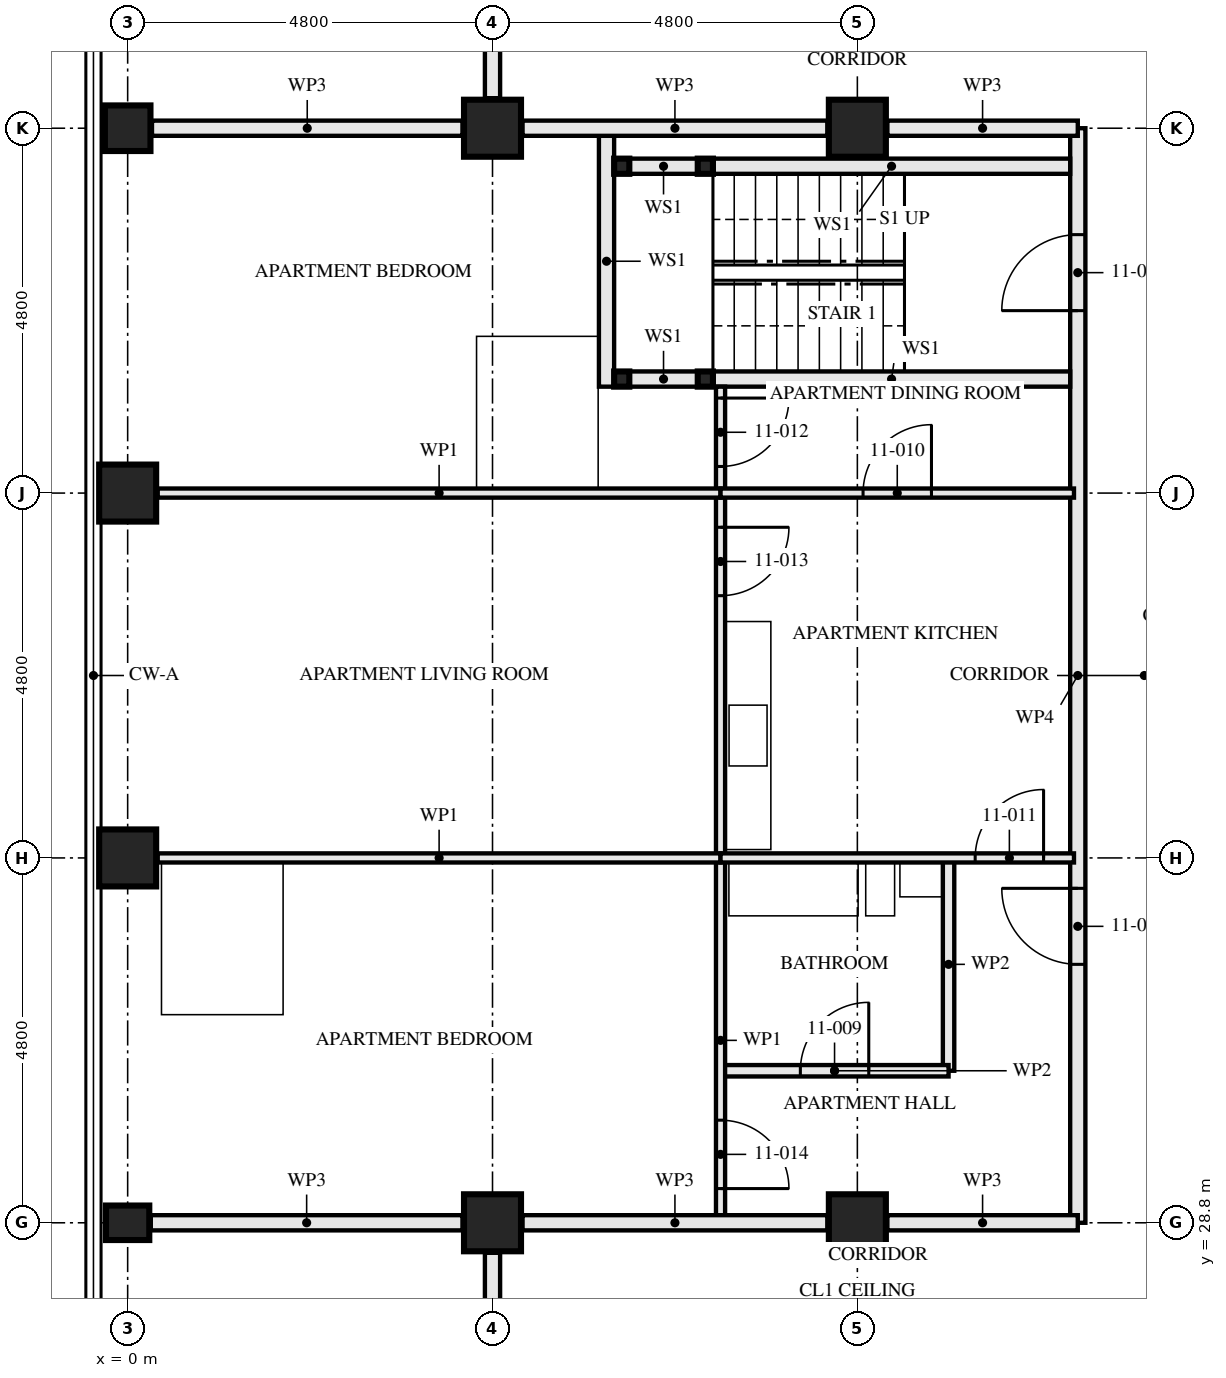
"""IFC4 building model, lengths in metres.
Left out: names, types, materials, properties, quantities, classifications, styles, units other than length and angle.
Written with IfcOpenShell. Run it as: python <this file> out.ifc"""

import sys

from ifc_helpers import new_model, si_unit, direction, frame, frame_2d, origin, origin_2d, place, context, subcontext, project, spatial, rectangle, hollow_rectangle, i_section, extrude, element, fill, save


model = new_model("IFC4")
c1 = context("Model", 3, precision=1e-05, world=origin(), true_north=direction((0.0, 1.0)))
c2 = subcontext(c1, "Body", "Model", "MODEL_VIEW")
j1 = project(units=[si_unit("LENGTHUNIT", "METRE"), si_unit("PLANEANGLEUNIT", "RADIAN")], contexts=[c1])
p1 = place(None, origin())
s1 = spatial("IfcSite", under=j1, at=p1, CompositionType="ELEMENT")
p2 = place(p1, origin())
s2 = spatial("IfcBuilding", under=s1, at=p2, CompositionType="ELEMENT")
p3 = place(p2, frame((0.0, 0.0, 44.5)))
s3 = spatial("IfcBuildingStorey", under=s2, at=p3, CompositionType="ELEMENT", Elevation=44.5)
p4 = place(p3, frame((0.0, 28.8, 0.0), z_axis=(0.0, 0.0, 1.0), x_axis=(0.0, 1.0, 0.0)))
e1 = element("IfcColumn", 1, at=p4, inside=s3, PredefinedType="COLUMN", context=c2, shape_type="SweptSolid", body=[
    extrude(i_section(OverallWidth=0.454, OverallDepth=0.569, WebThickness=0.078, FlangeThickness=0.125, FilletRadius=0.015, at=origin_2d()), origin(), (0.0, 0.0, 1.0), 3.5),
])
for number, where, z_axis, x_axis in (
    (2, (0.0, 33.6, 0.0), (0.0, 0.0, 1.0), (1.0, 0.0, 0.0)),
    (3, (0.0, 38.4, 0.0), (0.0, 0.0, 1.0), (1.0, 0.0, 0.0)),
):
    element("IfcColumn", number, at=place(p3, frame(where, z_axis=z_axis, x_axis=x_axis)), inside=s3, PredefinedType="COLUMN", context=c2, shape_type="SweptSolid", body=[
        extrude(hollow_rectangle(XDim=0.75, YDim=0.75, WallThickness=0.08, at=origin_2d()), origin(), (0.0, 0.0, 1.0), 3.5),
    ])
p5 = place(p3, frame((0.0, 43.2, 0.0), z_axis=(0.0, 0.0, 1.0), x_axis=(0.0, 1.0, 0.0)))
e4 = element("IfcColumn", 4, at=p5, inside=s3, PredefinedType="COLUMN", context=c2, shape_type="SweptSolid", body=[
    extrude(hollow_rectangle(XDim=0.6, YDim=0.6, WallThickness=0.08, at=origin_2d()), origin(), (0.0, 0.0, 1.0), 3.5),
])
for number, where, z_axis, x_axis in (
    (5, (4.8, 28.8, 0.0), (0.0, 0.0, 1.0), (0.0, 1.0, 0.0)),
    (6, (4.8, 43.2, 0.0), (0.0, 0.0, 1.0), (0.0, 1.0, 0.0)),
    (7, (9.6, 28.8, 0.0), (0.0, 0.0, 1.0), (0.0, 1.0, 0.0)),
    (8, (9.6, 43.2, 0.0), (0.0, 0.0, 1.0), (0.0, 1.0, 0.0)),
):
    element("IfcColumn", number, at=place(p3, frame(where, z_axis=z_axis, x_axis=x_axis)), inside=s3, PredefinedType="COLUMN", context=c2, shape_type="SweptSolid", body=[
        extrude(hollow_rectangle(XDim=0.75, YDim=0.75, WallThickness=0.08, at=origin_2d()), origin(), (0.0, 0.0, 1.0), 3.5),
    ])
for number, where, z_axis, x_axis in (
    (9, (6.5, 42.7, 0.0), (0.0, 0.0, 1.0), (1.0, 0.0, 0.0)),
    (10, (6.5, 39.9, 0.0), (0.0, 0.0, 1.0), (1.0, 0.0, 0.0)),
    (11, (7.6, 42.7, 0.0), (0.0, 0.0, 1.0), (1.0, 0.0, 0.0)),
    (12, (7.6, 39.9, 0.0), (0.0, 0.0, 1.0), (1.0, 0.0, 0.0)),
):
    element("IfcColumn", number, at=place(p3, frame(where, z_axis=z_axis, x_axis=x_axis)), inside=s3, PredefinedType="COLUMN", context=c2, shape_type="SweptSolid", body=[
        extrude(hollow_rectangle(XDim=0.2, YDim=0.2, WallThickness=0.008, at=origin_2d()), origin(), (0.0, 0.0, 1.0), 3.33),
    ])
p6 = place(p3, frame((4.8, 26.8, 0.0), z_axis=(0.0, 0.0, 1.0), x_axis=(0.0, 1.0, 0.0)))
e13 = element("IfcWall", 13, at=p6, inside=s3, PredefinedType="PARTITIONING", context=c2, shape_type="SweptSolid", body=[
    extrude(rectangle(XDim=1.605, YDim=0.2, at=frame_2d((0.802, 0.0))), origin(), (0.0, 0.0, 1.0), 3.33),
])
p7 = place(p3, frame((6.6, 42.7, 0.0), z_axis=(0.0, 0.0, 1.0), x_axis=(1.0, 0.0, 0.0)))
e14 = element("IfcWall", 14, at=p7, inside=s3, PredefinedType="SOLIDWALL", context=c2, shape_type="SweptSolid", body=[
    extrude(rectangle(XDim=0.9, YDim=0.2, at=frame_2d((0.45, 0.0))), origin(), (0.0, 0.0, 1.0), 2.99),
])
p8 = place(p3, frame((7.7, 42.7, 0.0), z_axis=(0.0, 0.0, 1.0), x_axis=(1.0, 0.0, 0.0)))
e15 = element("IfcWall", 15, at=p8, inside=s3, PredefinedType="SOLIDWALL", context=c2, shape_type="SweptSolid", body=[
    extrude(rectangle(XDim=4.7, YDim=0.2, at=frame_2d((2.35, 0.0))), origin(), (0.0, 0.0, 1.0), 2.99),
])
p9 = place(p3, frame((6.6, 39.9, 0.0), z_axis=(0.0, 0.0, 1.0), x_axis=(1.0, 0.0, 0.0)))
e16 = element("IfcWall", 16, at=p9, inside=s3, PredefinedType="SOLIDWALL", context=c2, shape_type="SweptSolid", body=[
    extrude(rectangle(XDim=0.9, YDim=0.2, at=frame_2d((0.45, 0.0))), origin(), (0.0, 0.0, 1.0), 2.99),
])
p10 = place(p3, frame((7.7, 39.9, 0.0), z_axis=(0.0, 0.0, 1.0), x_axis=(1.0, 0.0, 0.0)))
e17 = element("IfcWall", 17, at=p10, inside=s3, PredefinedType="SOLIDWALL", context=c2, shape_type="SweptSolid", body=[
    extrude(rectangle(XDim=4.7, YDim=0.2, at=frame_2d((2.35, 0.0))), origin(), (0.0, 0.0, 1.0), 2.99),
])
p11 = place(p3, frame((6.3, 43.1, 0.0), z_axis=(0.0, 0.0, 1.0), x_axis=(0.0, -1.0, 0.0)))
e18 = element("IfcWall", 18, at=p11, inside=s3, PredefinedType="SOLIDWALL", context=c2, shape_type="SweptSolid", body=[
    extrude(rectangle(XDim=3.3, YDim=0.2, at=frame_2d((1.65, 0.0))), origin(), (0.0, 0.0, 1.0), 3.33),
])
p12 = place(p3, frame((7.8, 30.8, 0.0), z_axis=(0.0, 0.0, 1.0), x_axis=(1.0, 0.0, 0.0)))
e19 = element("IfcWall", 19, at=p12, inside=s3, PredefinedType="PARTITIONING", context=c2, shape_type="SweptSolid", body=[
    extrude(rectangle(XDim=3.0, YDim=0.15, at=frame_2d((1.5, 0.0))), origin(), (0.0, 0.0, 1.0), 3.33),
])
p13 = place(p12, frame((1.05, 0.0, 0.0)))
e20 = element("IfcOpeningElement", 20, at=p13, cuts=e19, PredefinedType="OPENING", context=c2, shape_type="SweptSolid", body=[
    extrude(rectangle(XDim=0.9, YDim=2.1, at=frame_2d((0.45, 1.05))), frame((0.0, 0.085, 0.0), z_axis=(0.0, -1.0, 0.0), x_axis=(1.0, 0.0, 0.0)), (0.0, 0.0, 1.0), 0.171),
])
p14 = place(p3, frame((10.8, 33.6, 0.0), z_axis=(0.0, 0.0, 1.0), x_axis=(0.0, -1.0, 0.0)))
e21 = element("IfcWall", 21, at=p14, inside=s3, PredefinedType="PARTITIONING", context=c2, shape_type="SweptSolid", body=[
    extrude(rectangle(XDim=2.8, YDim=0.15, at=frame_2d((1.4, 0.0))), origin(), (0.0, 0.0, 1.0), 3.33),
])
p15 = place(p3, frame((7.8, 38.4, 0.0), z_axis=(0.0, 0.0, 1.0), x_axis=(1.0, 0.0, 0.0)))
e22 = element("IfcWall", 22, at=p15, inside=s3, PredefinedType="PARTITIONING", context=c2, shape_type="SweptSolid", body=[
    extrude(rectangle(XDim=4.65, YDim=0.12, at=frame_2d((2.325, 0.0))), origin(), (0.0, 0.0, 1.0), 2.55),
])
p16 = place(p15, frame((1.875, 0.0, 0.0)))
e23 = element("IfcOpeningElement", 23, at=p16, cuts=e22, PredefinedType="OPENING", context=c2, shape_type="SweptSolid", body=[
    extrude(rectangle(XDim=0.9, YDim=2.1, at=frame_2d((0.45, 1.05))), frame((0.0, 0.071, 0.0), z_axis=(0.0, -1.0, 0.0), x_axis=(1.0, 0.0, 0.0)), (0.0, 0.0, 1.0), 0.141),
])
p17 = place(p3, frame((7.8, 33.6, 0.0), z_axis=(0.0, 0.0, 1.0), x_axis=(1.0, 0.0, 0.0)))
e24 = element("IfcWall", 24, at=p17, inside=s3, PredefinedType="PARTITIONING", context=c2, shape_type="SweptSolid", body=[
    extrude(rectangle(XDim=4.65, YDim=0.12, at=frame_2d((2.325, 0.0))), origin(), (0.0, 0.0, 1.0), 2.55),
])
p18 = place(p17, frame((3.35, 0.0, 0.0)))
e25 = element("IfcOpeningElement", 25, at=p18, cuts=e24, PredefinedType="OPENING", context=c2, shape_type="SweptSolid", body=[
    extrude(rectangle(XDim=0.9, YDim=2.1, at=frame_2d((0.45, 1.05))), frame((0.0, 0.071, 0.0), z_axis=(0.0, -1.0, 0.0), x_axis=(1.0, 0.0, 0.0)), (0.0, 0.0, 1.0), 0.141),
])
p19 = place(p3, frame((7.8, 39.8, 0.0), z_axis=(0.0, 0.0, 1.0), x_axis=(0.0, -1.0, 0.0)))
e26 = element("IfcWall", 26, at=p19, inside=s3, PredefinedType="PARTITIONING", context=c2, shape_type="SweptSolid", body=[
    extrude(rectangle(XDim=1.4, YDim=0.12, at=frame_2d((0.7, 0.0))), origin(), (0.0, 0.0, 1.0), 3.33),
])
p20 = place(p19, frame((0.15, 0.0, 0.0)))
e27 = element("IfcOpeningElement", 27, at=p20, cuts=e26, PredefinedType="OPENING", context=c2, shape_type="SweptSolid", body=[
    extrude(rectangle(XDim=0.9, YDim=2.1, at=frame_2d((0.45, 1.05))), frame((0.0, 0.071, 0.0), z_axis=(0.0, -1.0, 0.0), x_axis=(1.0, 0.0, 0.0)), (0.0, 0.0, 1.0), 0.141),
])
p21 = place(p3, frame((7.8, 38.4, 0.0), z_axis=(0.0, 0.0, 1.0), x_axis=(0.0, -1.0, 0.0)))
e28 = element("IfcWall", 28, at=p21, inside=s3, PredefinedType="PARTITIONING", context=c2, shape_type="SweptSolid", body=[
    extrude(rectangle(XDim=4.8, YDim=0.12, at=frame_2d((2.4, 0.0))), origin(), (0.0, 0.0, 1.0), 3.33),
])
p22 = place(p21, frame((0.45, 0.0, 0.0)))
e29 = element("IfcOpeningElement", 29, at=p22, cuts=e28, PredefinedType="OPENING", context=c2, shape_type="SweptSolid", body=[
    extrude(rectangle(XDim=0.9, YDim=2.1, at=frame_2d((0.45, 1.05))), frame((0.0, 0.071, 0.0), z_axis=(0.0, -1.0, 0.0), x_axis=(1.0, 0.0, 0.0)), (0.0, 0.0, 1.0), 0.141),
])
p23 = place(p3, frame((7.8, 33.6, 0.0), z_axis=(0.0, 0.0, 1.0), x_axis=(0.0, -1.0, 0.0)))
e30 = element("IfcWall", 30, at=p23, inside=s3, PredefinedType="PARTITIONING", context=c2, shape_type="SweptSolid", body=[
    extrude(rectangle(XDim=4.8, YDim=0.12, at=frame_2d((2.4, 0.0))), origin(), (0.0, 0.0, 1.0), 3.33),
])
p24 = place(p23, frame((3.45, 0.0, 0.0)))
e31 = element("IfcOpeningElement", 31, at=p24, cuts=e30, PredefinedType="OPENING", context=c2, shape_type="SweptSolid", body=[
    extrude(rectangle(XDim=0.9, YDim=2.1, at=frame_2d((0.45, 1.05))), frame((0.0, 0.071, 0.0), z_axis=(0.0, -1.0, 0.0), x_axis=(1.0, 0.0, 0.0)), (0.0, 0.0, 1.0), 0.141),
])
for number, where, z_axis, x_axis in (
    (32, (0.395, 38.4, 0.0), (0.0, 0.0, 1.0), (1.0, 0.0, 0.0)),
    (33, (0.395, 33.6, 0.0), (0.0, 0.0, 1.0), (1.0, 0.0, 0.0)),
):
    element("IfcWall", number, at=place(p3, frame(where, z_axis=z_axis, x_axis=x_axis)), inside=s3, PredefinedType="PARTITIONING", context=c2, shape_type="SweptSolid", body=[
        extrude(rectangle(XDim=7.405, YDim=0.12, at=frame_2d((3.703, 0.0))), origin(), (0.0, 0.0, 1.0), 2.55),
    ])
p25 = place(p3, frame((12.5, 43.2, 0.0), z_axis=(0.0, 0.0, 1.0), x_axis=(0.0, -1.0, 0.0)))
e34 = element("IfcWall", 34, at=p25, inside=s3, PredefinedType="PARTITIONING", context=c2, shape_type="SweptSolid", body=[
    extrude(rectangle(XDim=14.4, YDim=0.2, at=frame_2d((7.2, 0.0))), origin(), (0.0, 0.0, 1.0), 2.55),
])
p26 = place(p25, frame((1.4, 0.0, 0.0)))
e35 = element("IfcOpeningElement", 35, at=p26, cuts=e34, PredefinedType="OPENING", context=c2, shape_type="SweptSolid", body=[
    extrude(rectangle(XDim=1.0, YDim=2.1, at=frame_2d((0.5, 1.05))), frame((0.0, 0.111, 0.0), z_axis=(0.0, -1.0, 0.0), x_axis=(1.0, 0.0, 0.0)), (0.0, 0.0, 1.0), 0.221),
])
p27 = place(p25, frame((10.0, 0.0, 0.0)))
e36 = element("IfcOpeningElement", 36, at=p27, cuts=e34, PredefinedType="OPENING", context=c2, shape_type="SweptSolid", body=[
    extrude(rectangle(XDim=1.0, YDim=2.1, at=frame_2d((0.5, 1.05))), frame((0.0, 0.111, 0.0), z_axis=(0.0, -1.0, 0.0), x_axis=(1.0, 0.0, 0.0)), (0.0, 0.0, 1.0), 0.221),
])
p28 = place(p3, frame((4.8, 45.2, 0.0), z_axis=(0.0, 0.0, 1.0), x_axis=(0.0, -1.0, 0.0)))
e37 = element("IfcWall", 37, at=p28, inside=s3, PredefinedType="PARTITIONING", context=c2, shape_type="SweptSolid", body=[
    extrude(rectangle(XDim=1.605, YDim=0.2, at=frame_2d((0.802, 0.0))), origin(), (0.0, 0.0, 1.0), 3.33),
])
p29 = place(p3, frame((12.5, 28.8, 0.0), z_axis=(0.0, 0.0, 1.0), x_axis=(-1.0, 0.0, 0.0)))
e38 = element("IfcWall", 38, at=p29, inside=s3, PredefinedType="PARTITIONING", context=c2, shape_type="SweptSolid", body=[
    extrude(rectangle(XDim=2.505, YDim=0.2, at=frame_2d((1.252, 0.0))), origin(), (0.0, 0.0, 1.0), 2.32),
])
p30 = place(p3, frame((9.205, 28.8, 0.0), z_axis=(0.0, 0.0, 1.0), x_axis=(-1.0, 0.0, 0.0)))
e39 = element("IfcWall", 39, at=p30, inside=s3, PredefinedType="PARTITIONING", context=c2, shape_type="SweptSolid", body=[
    extrude(rectangle(XDim=4.01, YDim=0.2, at=frame_2d((2.005, 0.0))), origin(), (0.0, 0.0, 1.0), 2.32),
])
p31 = place(p3, frame((4.405, 28.8, 0.0), z_axis=(0.0, 0.0, 1.0), x_axis=(-1.0, 0.0, 0.0)))
e40 = element("IfcWall", 40, at=p31, inside=s3, PredefinedType="PARTITIONING", context=c2, shape_type="SweptSolid", body=[
    extrude(rectangle(XDim=4.101, YDim=0.2, at=frame_2d((2.05, 0.0))), origin(), (0.0, 0.0, 1.0), 2.32),
])
p32 = place(p3, frame((12.5, 43.2, 0.0), z_axis=(0.0, 0.0, 1.0), x_axis=(-1.0, 0.0, 0.0)))
e41 = element("IfcWall", 41, at=p32, inside=s3, PredefinedType="PARTITIONING", context=c2, shape_type="SweptSolid", body=[
    extrude(rectangle(XDim=2.505, YDim=0.2, at=frame_2d((1.252, 0.0))), origin(), (0.0, 0.0, 1.0), 2.32),
])
p33 = place(p3, frame((9.205, 43.2, 0.0), z_axis=(0.0, 0.0, 1.0), x_axis=(-1.0, 0.0, 0.0)))
e42 = element("IfcWall", 42, at=p33, inside=s3, PredefinedType="PARTITIONING", context=c2, shape_type="SweptSolid", body=[
    extrude(rectangle(XDim=4.01, YDim=0.2, at=frame_2d((2.005, 0.0))), origin(), (0.0, 0.0, 1.0), 2.32),
])
p34 = place(p3, frame((4.405, 43.2, 0.0), z_axis=(0.0, 0.0, 1.0), x_axis=(-1.0, 0.0, 0.0)))
e43 = element("IfcWall", 43, at=p34, inside=s3, PredefinedType="PARTITIONING", context=c2, shape_type="SweptSolid", body=[
    extrude(rectangle(XDim=4.085, YDim=0.2, at=frame_2d((2.042, 0.0))), origin(), (0.0, 0.0, 1.0), 2.32),
])
p35 = place(p13, origin())
e44 = element("IfcDoor", 44, at=p35, inside=s3, OperationType="SINGLE_SWING_LEFT", PredefinedType="DOOR", context=c2, shape_type="SweptSolid", body=[
    extrude(rectangle(XDim=0.9, YDim=2.1, at=frame_2d((0.45, 1.05))), frame((0.0, 0.022, 0.0), z_axis=(0.0, -1.0, 0.0), x_axis=(1.0, 0.0, 0.0)), (0.0, 0.0, 1.0), 0.044),
])
fill(e20, e44)
p36 = place(p16, origin())
e45 = element("IfcDoor", 45, at=p36, inside=s3, OperationType="SINGLE_SWING_LEFT", PredefinedType="DOOR", context=c2, shape_type="SweptSolid", body=[
    extrude(rectangle(XDim=0.9, YDim=2.1, at=frame_2d((0.45, 1.05))), frame((0.0, 0.022, 0.0), z_axis=(0.0, -1.0, 0.0), x_axis=(1.0, 0.0, 0.0)), (0.0, 0.0, 1.0), 0.044),
])
fill(e23, e45)
p37 = place(p18, origin())
e46 = element("IfcDoor", 46, at=p37, inside=s3, OperationType="SINGLE_SWING_LEFT", PredefinedType="DOOR", context=c2, shape_type="SweptSolid", body=[
    extrude(rectangle(XDim=0.9, YDim=2.1, at=frame_2d((0.45, 1.05))), frame((0.0, 0.022, 0.0), z_axis=(0.0, -1.0, 0.0), x_axis=(1.0, 0.0, 0.0)), (0.0, 0.0, 1.0), 0.044),
])
fill(e25, e46)
p38 = place(p20, origin())
e47 = element("IfcDoor", 47, at=p38, inside=s3, OperationType="SINGLE_SWING_RIGHT", PredefinedType="DOOR", context=c2, shape_type="SweptSolid", body=[
    extrude(rectangle(XDim=0.9, YDim=2.1, at=frame_2d((0.45, 1.05))), frame((0.0, 0.022, 0.0), z_axis=(0.0, -1.0, 0.0), x_axis=(1.0, 0.0, 0.0)), (0.0, 0.0, 1.0), 0.044),
])
fill(e27, e47)
p39 = place(p22, origin())
e48 = element("IfcDoor", 48, at=p39, inside=s3, OperationType="SINGLE_SWING_RIGHT", PredefinedType="DOOR", context=c2, shape_type="SweptSolid", body=[
    extrude(rectangle(XDim=0.9, YDim=2.1, at=frame_2d((0.45, 1.05))), frame((0.0, 0.022, 0.0), z_axis=(0.0, -1.0, 0.0), x_axis=(1.0, 0.0, 0.0)), (0.0, 0.0, 1.0), 0.044),
])
fill(e29, e48)
p40 = place(p24, origin())
e49 = element("IfcDoor", 49, at=p40, inside=s3, OperationType="SINGLE_SWING_LEFT", PredefinedType="DOOR", context=c2, shape_type="SweptSolid", body=[
    extrude(rectangle(XDim=0.9, YDim=2.1, at=frame_2d((0.45, 1.05))), frame((0.0, 0.022, 0.0), z_axis=(0.0, -1.0, 0.0), x_axis=(1.0, 0.0, 0.0)), (0.0, 0.0, 1.0), 0.044),
])
fill(e31, e49)
p41 = place(p26, frame((1.0, 0.0, 0.0), z_axis=(0.0, 0.0, 1.0), x_axis=(-1.0, 0.0, 0.0)))
e50 = element("IfcDoor", 50, at=p41, inside=s3, OperationType="SINGLE_SWING_RIGHT", PredefinedType="DOOR", context=c2, shape_type="SweptSolid", body=[
    extrude(rectangle(XDim=1.0, YDim=2.1, at=frame_2d((0.5, 1.05))), frame((0.0, 0.032, 0.0), z_axis=(0.0, -1.0, 0.0), x_axis=(1.0, 0.0, 0.0)), (0.0, 0.0, 1.0), 0.064),
])
fill(e35, e50)
p42 = place(p27, frame((1.0, 0.0, 0.0), z_axis=(0.0, 0.0, 1.0), x_axis=(-1.0, 0.0, 0.0)))
e51 = element("IfcDoor", 51, at=p42, inside=s3, OperationType="SINGLE_SWING_LEFT", PredefinedType="DOOR", context=c2, shape_type="SweptSolid", body=[
    extrude(rectangle(XDim=1.0, YDim=2.1, at=frame_2d((0.5, 1.05))), frame((0.0, 0.027, 0.0), z_axis=(0.0, -1.0, 0.0), x_axis=(1.0, 0.0, 0.0)), (0.0, 0.0, 1.0), 0.054),
])
fill(e36, e51)
save(model, sys.argv[1])
